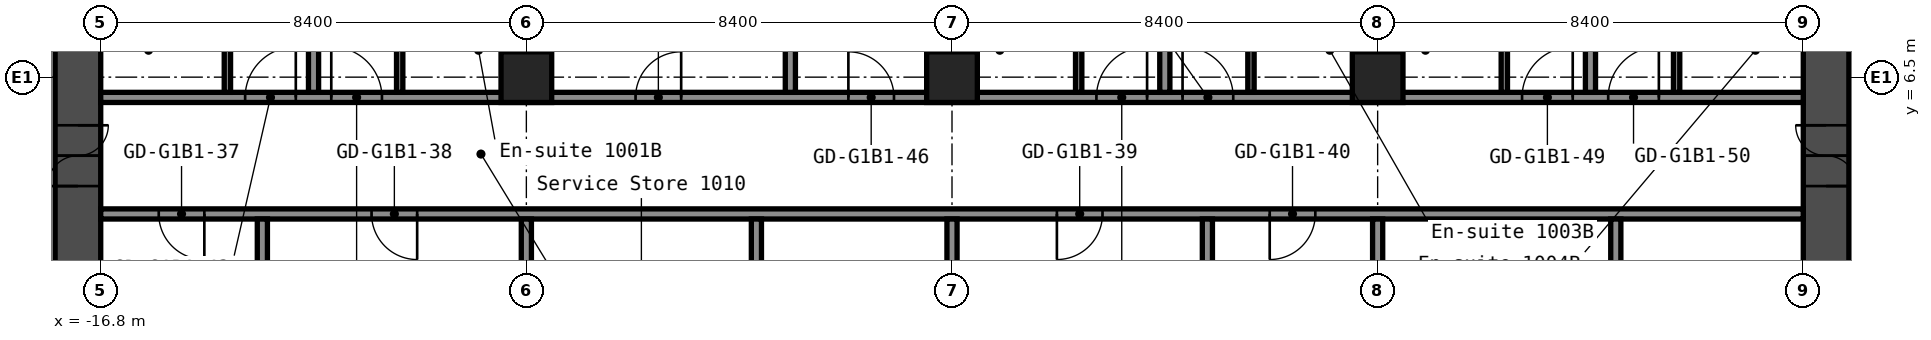
"""IFC4 building model, lengths in metres.
Left out: names, types, materials, properties, quantities, classifications, styles, units other than length and angle.
Written with IfcOpenShell. Run it as: python <this file> out.ifc"""

import sys

from ifc_helpers import new_model, si_unit, direction, frame, frame_2d, origin, origin_2d, place, context, subcontext, project, spatial, rectangle, hollow_rectangle, extrude, element, fill, save


model = new_model("IFC4")
c1 = context("Model", 3, precision=1e-05, world=origin(), true_north=direction((0.0, 1.0)))
c2 = subcontext(c1, "Body", "Model", "MODEL_VIEW")
j1 = project(units=[si_unit("LENGTHUNIT", "METRE"), si_unit("PLANEANGLEUNIT", "RADIAN")], contexts=[c1])
p1 = place(None, origin())
s1 = spatial("IfcSite", under=j1, at=p1, CompositionType="ELEMENT")
p2 = place(p1, origin())
s2 = spatial("IfcBuilding", under=s1, at=p2, CompositionType="ELEMENT")
p3 = place(p2, frame((0.0, 0.0, 39.0)))
s3 = spatial("IfcBuildingStorey", under=s2, at=p3, CompositionType="ELEMENT", Elevation=39.0)
for number, where, z_axis, x_axis in (
    (1, (-8.4, 6.5, 0.0), (0.0, 0.0, 1.0), (1.0, 0.0, 0.0)),
    (2, (0.0, 6.5, 0.0), (0.0, 0.0, 1.0), (1.0, 0.0, 0.0)),
    (3, (8.4, 6.5, 0.0), (0.0, 0.0, 1.0), (1.0, 0.0, 0.0)),
):
    element("IfcColumn", number, at=place(p3, frame(where, z_axis=z_axis, x_axis=x_axis)), inside=s3, PredefinedType="COLUMN", context=c2, shape_type="SweptSolid", body=[
        extrude(hollow_rectangle(XDim=1.0, YDim=1.0, WallThickness=0.04, at=origin_2d()), origin(), (0.0, 0.0, 1.0), 2.8),
    ])
p4 = place(p3, frame((-17.25, -8.4, 0.0), z_axis=(0.0, 0.0, 1.0), x_axis=(0.0, 1.0, 0.0)))
e4 = element("IfcWall", 4, at=p4, inside=s3, PredefinedType="SHEAR", context=c2, shape_type="SweptSolid", body=[
    extrude(rectangle(XDim=16.8, YDim=0.9, at=frame_2d((8.4, 0.0))), origin(), (0.0, 0.0, 1.0), 2.8),
])
p5 = place(p4, frame((12.75, 0.0, 0.0)))
e5 = element("IfcOpeningElement", 5, at=p5, cuts=e4, PredefinedType="OPENING", context=c2, shape_type="SweptSolid", body=[
    extrude(rectangle(XDim=1.2, YDim=2.1, at=frame_2d((0.6, 1.05))), frame((0.0, 0.46, 0.0), z_axis=(0.0, -1.0, 0.0), x_axis=(1.0, 0.0, 0.0)), (0.0, 0.0, 1.0), 0.92),
])
p6 = place(p4, frame((2.85, 0.0, 0.0)))
e6 = element("IfcOpeningElement", 6, at=p6, cuts=e4, PredefinedType="OPENING", context=c2, shape_type="SweptSolid", body=[
    extrude(rectangle(XDim=1.2, YDim=2.1, at=frame_2d((0.6, 1.05))), frame((0.0, 0.46, 0.0), z_axis=(0.0, -1.0, 0.0), x_axis=(1.0, 0.0, 0.0)), (0.0, 0.0, 1.0), 0.92),
])
p7 = place(p3, frame((17.25, -8.4, 0.0), z_axis=(0.0, 0.0, 1.0), x_axis=(0.0, 1.0, 0.0)))
e7 = element("IfcWall", 7, at=p7, inside=s3, PredefinedType="SHEAR", context=c2, shape_type="SweptSolid", body=[
    extrude(rectangle(XDim=16.8, YDim=0.9, at=frame_2d((8.4, 0.0))), origin(), (0.0, 0.0, 1.0), 2.8),
])
p8 = place(p7, frame((12.75, 0.0, 0.0)))
e8 = element("IfcOpeningElement", 8, at=p8, cuts=e7, PredefinedType="OPENING", context=c2, shape_type="SweptSolid", body=[
    extrude(rectangle(XDim=1.2, YDim=2.1, at=frame_2d((0.6, 1.05))), frame((0.0, 0.46, 0.0), z_axis=(0.0, -1.0, 0.0), x_axis=(1.0, 0.0, 0.0)), (0.0, 0.0, 1.0), 0.92),
])
p9 = place(p7, frame((2.85, 0.0, 0.0)))
e9 = element("IfcOpeningElement", 9, at=p9, cuts=e7, PredefinedType="OPENING", context=c2, shape_type="SweptSolid", body=[
    extrude(rectangle(XDim=1.2, YDim=2.1, at=frame_2d((0.6, 1.05))), frame((0.0, 0.46, 0.0), z_axis=(0.0, -1.0, 0.0), x_axis=(1.0, 0.0, 0.0)), (0.0, 0.0, 1.0), 0.92),
])
p10 = place(p3, frame((-16.8, 3.8, 0.0), z_axis=(0.0, 0.0, 1.0), x_axis=(1.0, 0.0, 0.0)))
e10 = element("IfcWall", 10, at=p10, inside=s3, PredefinedType="PARTITIONING", context=c2, shape_type="SweptSolid", body=[
    extrude(rectangle(XDim=33.6, YDim=0.2, at=frame_2d((16.8, 0.0))), origin(), (0.0, 0.0, 1.0), 2.8),
])
p11 = place(p10, frame((1.145, 0.0, 0.0)))
e11 = element("IfcOpeningElement", 11, at=p11, cuts=e10, PredefinedType="OPENING", context=c2, shape_type="SweptSolid", body=[
    extrude(rectangle(XDim=0.9, YDim=2.1, at=frame_2d((0.45, 1.05))), frame((0.0, 0.11, 0.0), z_axis=(0.0, -1.0, 0.0), x_axis=(1.0, 0.0, 0.0)), (0.0, 0.0, 1.0), 0.22),
])
p12 = place(p10, frame((5.345, 0.0, 0.0)))
e12 = element("IfcOpeningElement", 12, at=p12, cuts=e10, PredefinedType="OPENING", context=c2, shape_type="SweptSolid", body=[
    extrude(rectangle(XDim=0.9, YDim=2.1, at=frame_2d((0.45, 1.05))), frame((0.0, 0.11, 0.0), z_axis=(0.0, -1.0, 0.0), x_axis=(1.0, 0.0, 0.0)), (0.0, 0.0, 1.0), 0.22),
])
p13 = place(p10, frame((18.87, 0.0, 0.0)))
e13 = element("IfcOpeningElement", 13, at=p13, cuts=e10, PredefinedType="OPENING", context=c2, shape_type="SweptSolid", body=[
    extrude(rectangle(XDim=0.9, YDim=2.1, at=frame_2d((0.45, 1.05))), frame((0.0, 0.11, 0.0), z_axis=(0.0, -1.0, 0.0), x_axis=(1.0, 0.0, 0.0)), (0.0, 0.0, 1.0), 0.22),
])
p14 = place(p10, frame((23.07, 0.0, 0.0)))
e14 = element("IfcOpeningElement", 14, at=p14, cuts=e10, PredefinedType="OPENING", context=c2, shape_type="SweptSolid", body=[
    extrude(rectangle(XDim=0.9, YDim=2.1, at=frame_2d((0.45, 1.05))), frame((0.0, 0.11, 0.0), z_axis=(0.0, -1.0, 0.0), x_axis=(1.0, 0.0, 0.0)), (0.0, 0.0, 1.0), 0.22),
])
p15 = place(p3, frame((-16.8, 6.1, 0.0), z_axis=(0.0, 0.0, 1.0), x_axis=(1.0, 0.0, 0.0)))
e15 = element("IfcWall", 15, at=p15, inside=s3, PredefinedType="PARTITIONING", context=c2, shape_type="SweptSolid", body=[
    extrude(rectangle(XDim=33.6, YDim=0.2, at=frame_2d((16.8, 0.0))), origin(), (0.0, 0.0, 1.0), 2.8),
])
p16 = place(p15, frame((2.85, 0.0, 0.0)))
e16 = element("IfcOpeningElement", 16, at=p16, cuts=e15, PredefinedType="OPENING", context=c2, shape_type="SweptSolid", body=[
    extrude(rectangle(XDim=1.0, YDim=2.1, at=frame_2d((0.5, 1.05))), frame((0.0, 0.11, 0.0), z_axis=(0.0, -1.0, 0.0), x_axis=(1.0, 0.0, 0.0)), (0.0, 0.0, 1.0), 0.22),
])
p17 = place(p15, frame((4.55, 0.0, 0.0)))
e17 = element("IfcOpeningElement", 17, at=p17, cuts=e15, PredefinedType="OPENING", context=c2, shape_type="SweptSolid", body=[
    extrude(rectangle(XDim=1.0, YDim=2.1, at=frame_2d((0.5, 1.05))), frame((0.0, 0.11, 0.0), z_axis=(0.0, -1.0, 0.0), x_axis=(1.0, 0.0, 0.0)), (0.0, 0.0, 1.0), 0.22),
])
p18 = place(p15, frame((10.555, 0.0, 0.0)))
e18 = element("IfcOpeningElement", 18, at=p18, cuts=e15, PredefinedType="OPENING", context=c2, shape_type="SweptSolid", body=[
    extrude(rectangle(XDim=0.9, YDim=2.1, at=frame_2d((0.45, 1.05))), frame((0.0, 0.11, 0.0), z_axis=(0.0, -1.0, 0.0), x_axis=(1.0, 0.0, 0.0)), (0.0, 0.0, 1.0), 0.22),
])
p19 = place(p15, frame((14.755, 0.0, 0.0)))
e19 = element("IfcOpeningElement", 19, at=p19, cuts=e15, PredefinedType="OPENING", context=c2, shape_type="SweptSolid", body=[
    extrude(rectangle(XDim=0.9, YDim=2.1, at=frame_2d((0.45, 1.05))), frame((0.0, 0.11, 0.0), z_axis=(0.0, -1.0, 0.0), x_axis=(1.0, 0.0, 0.0)), (0.0, 0.0, 1.0), 0.22),
])
p20 = place(p15, frame((19.65, 0.0, 0.0)))
e20 = element("IfcOpeningElement", 20, at=p20, cuts=e15, PredefinedType="OPENING", context=c2, shape_type="SweptSolid", body=[
    extrude(rectangle(XDim=1.0, YDim=2.1, at=frame_2d((0.5, 1.05))), frame((0.0, 0.11, 0.0), z_axis=(0.0, -1.0, 0.0), x_axis=(1.0, 0.0, 0.0)), (0.0, 0.0, 1.0), 0.22),
])
p21 = place(p15, frame((21.35, 0.0, 0.0)))
e21 = element("IfcOpeningElement", 21, at=p21, cuts=e15, PredefinedType="OPENING", context=c2, shape_type="SweptSolid", body=[
    extrude(rectangle(XDim=1.0, YDim=2.1, at=frame_2d((0.5, 1.05))), frame((0.0, 0.11, 0.0), z_axis=(0.0, -1.0, 0.0), x_axis=(1.0, 0.0, 0.0)), (0.0, 0.0, 1.0), 0.22),
])
p22 = place(p15, frame((28.05, 0.0, 0.0)))
e22 = element("IfcOpeningElement", 22, at=p22, cuts=e15, PredefinedType="OPENING", context=c2, shape_type="SweptSolid", body=[
    extrude(rectangle(XDim=1.0, YDim=2.1, at=frame_2d((0.5, 1.05))), frame((0.0, 0.11, 0.0), z_axis=(0.0, -1.0, 0.0), x_axis=(1.0, 0.0, 0.0)), (0.0, 0.0, 1.0), 0.22),
])
p23 = place(p15, frame((29.75, 0.0, 0.0)))
e23 = element("IfcOpeningElement", 23, at=p23, cuts=e15, PredefinedType="OPENING", context=c2, shape_type="SweptSolid", body=[
    extrude(rectangle(XDim=1.0, YDim=2.1, at=frame_2d((0.5, 1.05))), frame((0.0, 0.11, 0.0), z_axis=(0.0, -1.0, 0.0), x_axis=(1.0, 0.0, 0.0)), (0.0, 0.0, 1.0), 0.22),
])
p24 = place(p3, frame((-14.3, 6.2, 0.0), z_axis=(0.0, 0.0, 1.0), x_axis=(0.0, 1.0, 0.0)))
e24 = element("IfcWall", 24, at=p24, inside=s3, PredefinedType="PARTITIONING", context=c2, shape_type="SweptSolid", body=[
    extrude(rectangle(XDim=2.9, YDim=0.125, at=frame_2d((1.45, 0.0))), origin(), (0.0, 0.0, 1.0), 2.8),
])
p25 = place(p24, frame((1.5, 0.0, 0.0)))
e25 = element("IfcOpeningElement", 25, at=p25, cuts=e24, PredefinedType="OPENING", context=c2, shape_type="SweptSolid", body=[
    extrude(rectangle(XDim=0.8, YDim=2.1, at=frame_2d((0.4, 1.05))), frame((0.0, 0.073, 0.0), z_axis=(0.0, -1.0, 0.0), x_axis=(1.0, 0.0, 0.0)), (0.0, 0.0, 1.0), 0.145),
])
p26 = place(p3, frame((-13.61, -3.7, 0.0), z_axis=(0.0, 0.0, 1.0), x_axis=(0.0, 1.0, 0.0)))
e26 = element("IfcWall", 26, at=p26, inside=s3, PredefinedType="PARTITIONING", context=c2, shape_type="SweptSolid", body=[
    extrude(rectangle(XDim=7.4, YDim=0.2, at=frame_2d((3.7, 0.0))), origin(), (0.0, 0.0, 1.0), 2.8),
])
p27 = place(p3, frame((-12.6, 6.2, 0.0), z_axis=(0.0, 0.0, 1.0), x_axis=(0.0, 1.0, 0.0)))
e27 = element("IfcWall", 27, at=p27, inside=s3, PredefinedType="PARTITIONING", context=c2, shape_type="SweptSolid", body=[
    extrude(rectangle(XDim=14.1, YDim=0.2, at=frame_2d((7.05, 0.0))), origin(), (0.0, 0.0, 1.0), 2.8),
])
p28 = place(p3, frame((-10.9, 6.2, 0.0), z_axis=(0.0, 0.0, 1.0), x_axis=(0.0, 1.0, 0.0)))
e28 = element("IfcWall", 28, at=p28, inside=s3, PredefinedType="PARTITIONING", context=c2, shape_type="SweptSolid", body=[
    extrude(rectangle(XDim=2.9, YDim=0.125, at=frame_2d((1.45, 0.0))), origin(), (0.0, 0.0, 1.0), 2.8),
])
p29 = place(p28, frame((1.5, 0.0, 0.0)))
e29 = element("IfcOpeningElement", 29, at=p29, cuts=e28, PredefinedType="OPENING", context=c2, shape_type="SweptSolid", body=[
    extrude(rectangle(XDim=0.8, YDim=2.1, at=frame_2d((0.4, 1.05))), frame((0.0, 0.073, 0.0), z_axis=(0.0, -1.0, 0.0), x_axis=(1.0, 0.0, 0.0)), (0.0, 0.0, 1.0), 0.145),
])
p30 = place(p3, frame((-8.4, -3.7, 0.0), z_axis=(0.0, 0.0, 1.0), x_axis=(0.0, 1.0, 0.0)))
e30 = element("IfcWall", 30, at=p30, inside=s3, PredefinedType="PARTITIONING", context=c2, shape_type="SweptSolid", body=[
    extrude(rectangle(XDim=7.4, YDim=0.2, at=frame_2d((3.7, 0.0))), origin(), (0.0, 0.0, 1.0), 2.8),
])
p31 = place(p3, frame((-8.4, 6.99, 0.0), z_axis=(0.0, 0.0, 1.0), x_axis=(0.0, 1.0, 0.0)))
e31 = element("IfcWall", 31, at=p31, inside=s3, PredefinedType="PARTITIONING", context=c2, shape_type="SweptSolid", body=[
    extrude(rectangle(XDim=13.31, YDim=0.2, at=frame_2d((6.655, 0.0))), origin(), (0.0, 0.0, 1.0), 2.8),
])
p32 = place(p3, frame((-3.86, -3.7, 0.0), z_axis=(0.0, 0.0, 1.0), x_axis=(0.0, 1.0, 0.0)))
e32 = element("IfcWall", 32, at=p32, inside=s3, PredefinedType="PARTITIONING", context=c2, shape_type="SweptSolid", body=[
    extrude(rectangle(XDim=7.4, YDim=0.2, at=frame_2d((3.7, 0.0))), origin(), (0.0, 0.0, 1.0), 2.8),
])
p33 = place(p3, frame((-3.19, 6.2, 0.0), z_axis=(0.0, 0.0, 1.0), x_axis=(0.0, 1.0, 0.0)))
e33 = element("IfcWall", 33, at=p33, inside=s3, PredefinedType="PARTITIONING", context=c2, shape_type="SweptSolid", body=[
    extrude(rectangle(XDim=14.1, YDim=0.2, at=frame_2d((7.05, 0.0))), origin(), (0.0, 0.0, 1.0), 2.8),
])
p34 = place(p3, frame((0.0, -3.7, 0.0), z_axis=(0.0, 0.0, 1.0), x_axis=(0.0, 1.0, 0.0)))
e34 = element("IfcWall", 34, at=p34, inside=s3, PredefinedType="PARTITIONING", context=c2, shape_type="SweptSolid", body=[
    extrude(rectangle(XDim=7.4, YDim=0.2, at=frame_2d((3.7, 0.0))), origin(), (0.0, 0.0, 1.0), 2.8),
])
p35 = place(p3, frame((0.0, 6.99, 0.0), z_axis=(0.0, 0.0, 1.0), x_axis=(0.0, 1.0, 0.0)))
e35 = element("IfcWall", 35, at=p35, inside=s3, PredefinedType="PARTITIONING", context=c2, shape_type="SweptSolid", body=[
    extrude(rectangle(XDim=13.31, YDim=0.2, at=frame_2d((6.655, 0.0))), origin(), (0.0, 0.0, 1.0), 2.8),
])
p36 = place(p3, frame((2.5, 6.2, 0.0), z_axis=(0.0, 0.0, 1.0), x_axis=(0.0, 1.0, 0.0)))
e36 = element("IfcWall", 36, at=p36, inside=s3, PredefinedType="PARTITIONING", context=c2, shape_type="SweptSolid", body=[
    extrude(rectangle(XDim=2.9, YDim=0.125, at=frame_2d((1.45, 0.0))), origin(), (0.0, 0.0, 1.0), 2.8),
])
p37 = place(p36, frame((1.5, 0.0, 0.0)))
e37 = element("IfcOpeningElement", 37, at=p37, cuts=e36, PredefinedType="OPENING", context=c2, shape_type="SweptSolid", body=[
    extrude(rectangle(XDim=0.8, YDim=2.1, at=frame_2d((0.4, 1.05))), frame((0.0, 0.073, 0.0), z_axis=(0.0, -1.0, 0.0), x_axis=(1.0, 0.0, 0.0)), (0.0, 0.0, 1.0), 0.145),
])
p38 = place(p3, frame((4.2, 6.2, 0.0), z_axis=(0.0, 0.0, 1.0), x_axis=(0.0, 1.0, 0.0)))
e38 = element("IfcWall", 38, at=p38, inside=s3, PredefinedType="PARTITIONING", context=c2, shape_type="SweptSolid", body=[
    extrude(rectangle(XDim=14.1, YDim=0.2, at=frame_2d((7.05, 0.0))), origin(), (0.0, 0.0, 1.0), 2.8),
])
p39 = place(p3, frame((5.04, -3.7, 0.0), z_axis=(0.0, 0.0, 1.0), x_axis=(0.0, 1.0, 0.0)))
e39 = element("IfcWall", 39, at=p39, inside=s3, PredefinedType="PARTITIONING", context=c2, shape_type="SweptSolid", body=[
    extrude(rectangle(XDim=7.4, YDim=0.2, at=frame_2d((3.7, 0.0))), origin(), (0.0, 0.0, 1.0), 2.8),
])
p40 = place(p3, frame((5.9, 6.2, 0.0), z_axis=(0.0, 0.0, 1.0), x_axis=(0.0, 1.0, 0.0)))
e40 = element("IfcWall", 40, at=p40, inside=s3, PredefinedType="PARTITIONING", context=c2, shape_type="SweptSolid", body=[
    extrude(rectangle(XDim=2.9, YDim=0.125, at=frame_2d((1.45, 0.0))), origin(), (0.0, 0.0, 1.0), 2.8),
])
p41 = place(p40, frame((1.5, 0.0, 0.0)))
e41 = element("IfcOpeningElement", 41, at=p41, cuts=e40, PredefinedType="OPENING", context=c2, shape_type="SweptSolid", body=[
    extrude(rectangle(XDim=0.8, YDim=2.1, at=frame_2d((0.4, 1.05))), frame((0.0, 0.073, 0.0), z_axis=(0.0, -1.0, 0.0), x_axis=(1.0, 0.0, 0.0)), (0.0, 0.0, 1.0), 0.145),
])
p42 = place(p3, frame((8.4, -3.7, 0.0), z_axis=(0.0, 0.0, 1.0), x_axis=(0.0, 1.0, 0.0)))
e42 = element("IfcWall", 42, at=p42, inside=s3, PredefinedType="PARTITIONING", context=c2, shape_type="SweptSolid", body=[
    extrude(rectangle(XDim=7.4, YDim=0.2, at=frame_2d((3.7, 0.0))), origin(), (0.0, 0.0, 1.0), 2.8),
])
p43 = place(p3, frame((8.4, 6.99, 0.0), z_axis=(0.0, 0.0, 1.0), x_axis=(0.0, 1.0, 0.0)))
e43 = element("IfcWall", 43, at=p43, inside=s3, PredefinedType="PARTITIONING", context=c2, shape_type="SweptSolid", body=[
    extrude(rectangle(XDim=13.31, YDim=0.2, at=frame_2d((6.655, 0.0))), origin(), (0.0, 0.0, 1.0), 2.8),
])
p44 = place(p3, frame((10.9, 6.2, 0.0), z_axis=(0.0, 0.0, 1.0), x_axis=(0.0, 1.0, 0.0)))
e44 = element("IfcWall", 44, at=p44, inside=s3, PredefinedType="PARTITIONING", context=c2, shape_type="SweptSolid", body=[
    extrude(rectangle(XDim=2.9, YDim=0.125, at=frame_2d((1.45, 0.0))), origin(), (0.0, 0.0, 1.0), 2.8),
])
p45 = place(p44, frame((1.5, 0.0, 0.0)))
e45 = element("IfcOpeningElement", 45, at=p45, cuts=e44, PredefinedType="OPENING", context=c2, shape_type="SweptSolid", body=[
    extrude(rectangle(XDim=0.8, YDim=2.1, at=frame_2d((0.4, 1.05))), frame((0.0, 0.073, 0.0), z_axis=(0.0, -1.0, 0.0), x_axis=(1.0, 0.0, 0.0)), (0.0, 0.0, 1.0), 0.145),
])
p46 = place(p3, frame((12.6, 6.2, 0.0), z_axis=(0.0, 0.0, 1.0), x_axis=(0.0, 1.0, 0.0)))
e46 = element("IfcWall", 46, at=p46, inside=s3, PredefinedType="PARTITIONING", context=c2, shape_type="SweptSolid", body=[
    extrude(rectangle(XDim=14.1, YDim=0.2, at=frame_2d((7.05, 0.0))), origin(), (0.0, 0.0, 1.0), 2.8),
])
p47 = place(p3, frame((13.1, -3.7, 0.0), z_axis=(0.0, 0.0, 1.0), x_axis=(0.0, 1.0, 0.0)))
e47 = element("IfcWall", 47, at=p47, inside=s3, PredefinedType="PARTITIONING", context=c2, shape_type="SweptSolid", body=[
    extrude(rectangle(XDim=7.4, YDim=0.2, at=frame_2d((3.7, 0.0))), origin(), (0.0, 0.0, 1.0), 2.8),
])
p48 = place(p3, frame((14.3, 6.2, 0.0), z_axis=(0.0, 0.0, 1.0), x_axis=(0.0, 1.0, 0.0)))
e48 = element("IfcWall", 48, at=p48, inside=s3, PredefinedType="PARTITIONING", context=c2, shape_type="SweptSolid", body=[
    extrude(rectangle(XDim=2.9, YDim=0.125, at=frame_2d((1.45, 0.0))), origin(), (0.0, 0.0, 1.0), 2.8),
])
p49 = place(p48, frame((1.5, 0.0, 0.0)))
e49 = element("IfcOpeningElement", 49, at=p49, cuts=e48, PredefinedType="OPENING", context=c2, shape_type="SweptSolid", body=[
    extrude(rectangle(XDim=0.8, YDim=2.1, at=frame_2d((0.4, 1.05))), frame((0.0, 0.073, 0.0), z_axis=(0.0, -1.0, 0.0), x_axis=(1.0, 0.0, 0.0)), (0.0, 0.0, 1.0), 0.145),
])
p50 = place(p5, origin())
e50 = element("IfcDoor", 50, at=p50, inside=s3, OperationType="DOUBLE_DOOR_SINGLE_SWING", PredefinedType="DOOR", context=c2, shape_type="SweptSolid", body=[
    extrude(rectangle(XDim=1.2, YDim=2.1, at=frame_2d((0.6, 1.05))), frame((0.0, 0.025, 0.0), z_axis=(0.0, -1.0, 0.0), x_axis=(1.0, 0.0, 0.0)), (0.0, 0.0, 1.0), 0.05),
])
fill(e5, e50)
p51 = place(p8, origin())
e51 = element("IfcDoor", 51, at=p51, inside=s3, OperationType="DOUBLE_DOOR_SINGLE_SWING", PredefinedType="DOOR", context=c2, shape_type="SweptSolid", body=[
    extrude(rectangle(XDim=1.2, YDim=2.1, at=frame_2d((0.6, 1.05))), frame((0.0, 0.025, 0.0), z_axis=(0.0, -1.0, 0.0), x_axis=(1.0, 0.0, 0.0)), (0.0, 0.0, 1.0), 0.05),
])
fill(e8, e51)
p52 = place(p11, origin())
e52 = element("IfcDoor", 52, at=p52, inside=s3, OperationType="SINGLE_SWING_RIGHT", PredefinedType="DOOR", context=c2, shape_type="SweptSolid", body=[
    extrude(rectangle(XDim=0.9, YDim=2.1, at=frame_2d((0.45, 1.05))), frame((0.0, 0.025, 0.0), z_axis=(0.0, -1.0, 0.0), x_axis=(1.0, 0.0, 0.0)), (0.0, 0.0, 1.0), 0.05),
])
fill(e11, e52)
p53 = place(p12, origin())
e53 = element("IfcDoor", 53, at=p53, inside=s3, OperationType="SINGLE_SWING_RIGHT", PredefinedType="DOOR", context=c2, shape_type="SweptSolid", body=[
    extrude(rectangle(XDim=0.9, YDim=2.1, at=frame_2d((0.45, 1.05))), frame((0.0, 0.025, 0.0), z_axis=(0.0, -1.0, 0.0), x_axis=(1.0, 0.0, 0.0)), (0.0, 0.0, 1.0), 0.05),
])
fill(e12, e53)
p54 = place(p13, origin())
e54 = element("IfcDoor", 54, at=p54, inside=s3, OperationType="SINGLE_SWING_LEFT", PredefinedType="DOOR", context=c2, shape_type="SweptSolid", body=[
    extrude(rectangle(XDim=0.9, YDim=2.1, at=frame_2d((0.45, 1.05))), frame((0.0, 0.025, 0.0), z_axis=(0.0, -1.0, 0.0), x_axis=(1.0, 0.0, 0.0)), (0.0, 0.0, 1.0), 0.05),
])
fill(e13, e54)
p55 = place(p14, origin())
e55 = element("IfcDoor", 55, at=p55, inside=s3, OperationType="SINGLE_SWING_LEFT", PredefinedType="DOOR", context=c2, shape_type="SweptSolid", body=[
    extrude(rectangle(XDim=0.9, YDim=2.1, at=frame_2d((0.45, 1.05))), frame((0.0, 0.025, 0.0), z_axis=(0.0, -1.0, 0.0), x_axis=(1.0, 0.0, 0.0)), (0.0, 0.0, 1.0), 0.05),
])
fill(e14, e55)
p56 = place(p16, origin())
e56 = element("IfcDoor", 56, at=p56, inside=s3, OperationType="SINGLE_SWING_LEFT", PredefinedType="DOOR", context=c2, shape_type="SweptSolid", body=[
    extrude(rectangle(XDim=1.0, YDim=2.1, at=frame_2d((0.5, 1.05))), frame((0.0, 0.025, 0.0), z_axis=(0.0, -1.0, 0.0), x_axis=(1.0, 0.0, 0.0)), (0.0, 0.0, 1.0), 0.05),
])
fill(e16, e56)
p57 = place(p17, origin())
e57 = element("IfcDoor", 57, at=p57, inside=s3, OperationType="SINGLE_SWING_RIGHT", PredefinedType="DOOR", context=c2, shape_type="SweptSolid", body=[
    extrude(rectangle(XDim=1.0, YDim=2.1, at=frame_2d((0.5, 1.05))), frame((0.0, 0.025, 0.0), z_axis=(0.0, -1.0, 0.0), x_axis=(1.0, 0.0, 0.0)), (0.0, 0.0, 1.0), 0.05),
])
fill(e17, e57)
p58 = place(p18, origin())
e58 = element("IfcDoor", 58, at=p58, inside=s3, OperationType="SINGLE_SWING_LEFT", PredefinedType="DOOR", context=c2, shape_type="SweptSolid", body=[
    extrude(rectangle(XDim=0.9, YDim=2.1, at=frame_2d((0.45, 1.05))), frame((0.0, 0.025, 0.0), z_axis=(0.0, -1.0, 0.0), x_axis=(1.0, 0.0, 0.0)), (0.0, 0.0, 1.0), 0.05),
])
fill(e18, e58)
p59 = place(p19, origin())
e59 = element("IfcDoor", 59, at=p59, inside=s3, OperationType="SINGLE_SWING_RIGHT", PredefinedType="DOOR", context=c2, shape_type="SweptSolid", body=[
    extrude(rectangle(XDim=0.9, YDim=2.1, at=frame_2d((0.45, 1.05))), frame((0.0, 0.025, 0.0), z_axis=(0.0, -1.0, 0.0), x_axis=(1.0, 0.0, 0.0)), (0.0, 0.0, 1.0), 0.05),
])
fill(e19, e59)
p60 = place(p20, origin())
e60 = element("IfcDoor", 60, at=p60, inside=s3, OperationType="SINGLE_SWING_LEFT", PredefinedType="DOOR", context=c2, shape_type="SweptSolid", body=[
    extrude(rectangle(XDim=1.0, YDim=2.1, at=frame_2d((0.5, 1.05))), frame((0.0, 0.025, 0.0), z_axis=(0.0, -1.0, 0.0), x_axis=(1.0, 0.0, 0.0)), (0.0, 0.0, 1.0), 0.05),
])
fill(e20, e60)
p61 = place(p21, origin())
e61 = element("IfcDoor", 61, at=p61, inside=s3, OperationType="SINGLE_SWING_RIGHT", PredefinedType="DOOR", context=c2, shape_type="SweptSolid", body=[
    extrude(rectangle(XDim=1.0, YDim=2.1, at=frame_2d((0.5, 1.05))), frame((0.0, 0.025, 0.0), z_axis=(0.0, -1.0, 0.0), x_axis=(1.0, 0.0, 0.0)), (0.0, 0.0, 1.0), 0.05),
])
fill(e21, e61)
p62 = place(p22, origin())
e62 = element("IfcDoor", 62, at=p62, inside=s3, OperationType="SINGLE_SWING_LEFT", PredefinedType="DOOR", context=c2, shape_type="SweptSolid", body=[
    extrude(rectangle(XDim=1.0, YDim=2.1, at=frame_2d((0.5, 1.05))), frame((0.0, 0.025, 0.0), z_axis=(0.0, -1.0, 0.0), x_axis=(1.0, 0.0, 0.0)), (0.0, 0.0, 1.0), 0.05),
])
fill(e22, e62)
p63 = place(p23, origin())
e63 = element("IfcDoor", 63, at=p63, inside=s3, OperationType="SINGLE_SWING_LEFT", PredefinedType="DOOR", context=c2, shape_type="SweptSolid", body=[
    extrude(rectangle(XDim=1.0, YDim=2.1, at=frame_2d((0.5, 1.05))), frame((0.0, 0.025, 0.0), z_axis=(0.0, -1.0, 0.0), x_axis=(1.0, 0.0, 0.0)), (0.0, 0.0, 1.0), 0.05),
])
fill(e23, e63)
save(model, sys.argv[1])
